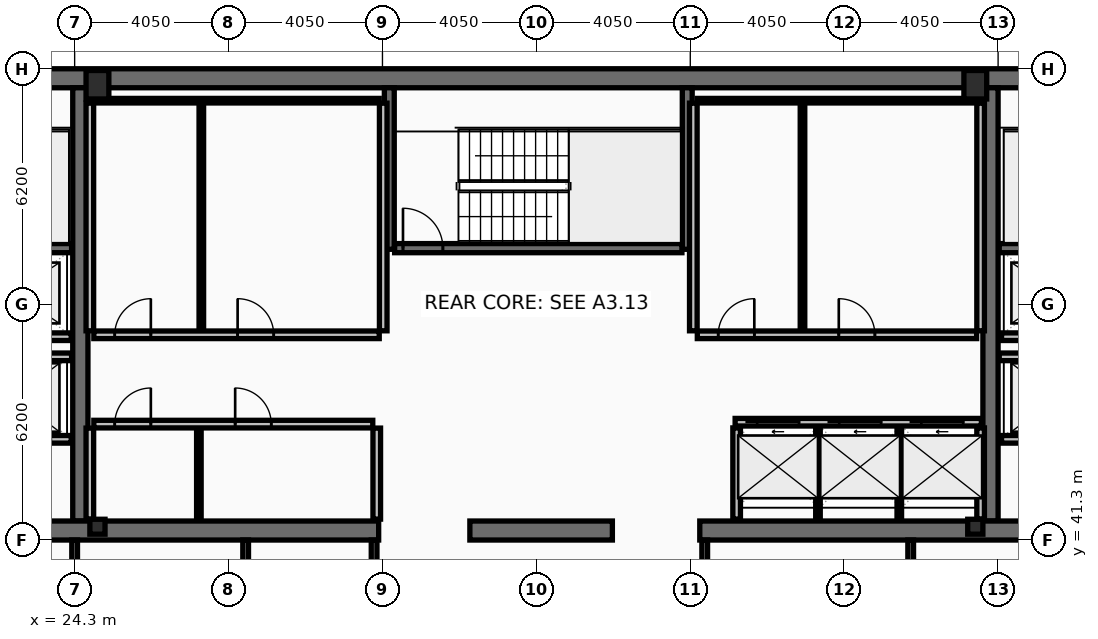
"""IFC4 building model, lengths in metres.
Left out: names, types, materials, properties, quantities, classifications, styles, units other than length and angle.
Written with IfcOpenShell. Run it as: python <this file> out.ifc"""

import sys

from ifc_helpers import new_model, si_unit, direction, frame, frame_2d, origin, origin_2d, place, context, subcontext, project, spatial, rectangle, hollow_rectangle, i_section, extrude, element, fill, save


model = new_model("IFC4")
c1 = context("Model", 3, precision=1e-05, world=origin(), true_north=direction((0.0, 1.0)))
c2 = subcontext(c1, "Body", "Model", "MODEL_VIEW")
j1 = project(units=[si_unit("LENGTHUNIT", "METRE"), si_unit("PLANEANGLEUNIT", "RADIAN")], contexts=[c1])
p1 = place(None, origin())
s1 = spatial("IfcSite", under=j1, at=p1, CompositionType="ELEMENT")
p2 = place(p1, origin())
s2 = spatial("IfcBuilding", under=s1, at=p2, CompositionType="ELEMENT")
p3 = place(p2, frame((0.0, 0.0, 287.8)))
s3 = spatial("IfcBuildingStorey", under=s2, at=p3, CompositionType="ELEMENT", Elevation=287.8)
p4 = place(p3, frame((16.2, 53.45, 0.0), z_axis=(0.0, 0.0, 1.0), x_axis=(1.0, 0.0, 0.0)))
e1 = element("IfcWall", 1, at=p4, inside=s3, PredefinedType="SHEAR", context=c2, shape_type="SweptSolid", body=[
    extrude(rectangle(XDim=40.5, YDim=0.5, at=frame_2d((20.25, 0.0))), origin(), (0.0, 0.0, 1.0), 3.44),
])
for number, where, z_axis, x_axis in (
    (2, (24.45, 41.8, 0.0), (0.0, 0.0, 1.0), (0.0, 1.0, 0.0)),
    (3, (48.4, 41.8, 0.0), (0.0, 0.0, 1.0), (0.0, 1.0, 0.0)),
):
    element("IfcWall", number, at=place(p3, frame(where, z_axis=z_axis, x_axis=x_axis)), inside=s3, PredefinedType="SHEAR", context=c2, shape_type="SweptSolid", body=[
        extrude(rectangle(XDim=11.4, YDim=0.4, at=frame_2d((5.7, 0.0))), origin(), (0.0, 0.0, 1.0), 3.44),
    ])
p5 = place(p3, frame((32.3, 41.55, 0.0), z_axis=(0.0, 0.0, 1.0), x_axis=(-1.0, 0.0, 0.0)))
e4 = element("IfcWall", 4, at=p5, inside=s3, PredefinedType="SHEAR", context=c2, shape_type="SweptSolid", body=[
    extrude(rectangle(XDim=11.45, YDim=0.5, at=frame_2d((5.725, 0.0))), origin(), (0.0, 0.0, 1.0), 3.44),
])
p6 = place(p3, frame((38.45, 41.55, 0.0), z_axis=(0.0, 0.0, 1.0), x_axis=(-1.0, 0.0, 0.0)))
e5 = element("IfcWall", 5, at=p6, inside=s3, PredefinedType="SHEAR", context=c2, shape_type="SweptSolid", body=[
    extrude(rectangle(XDim=3.75, YDim=0.5, at=frame_2d((1.875, 0.0))), origin(), (0.0, 0.0, 1.0), 3.44),
])
p7 = place(p3, frame((52.05, 41.55, 0.0), z_axis=(0.0, 0.0, 1.0), x_axis=(-1.0, 0.0, 0.0)))
e6 = element("IfcWall", 6, at=p7, inside=s3, PredefinedType="SHEAR", context=c2, shape_type="SweptSolid", body=[
    extrude(rectangle(XDim=11.3, YDim=0.5, at=frame_2d((5.65, 0.0))), origin(), (0.0, 0.0, 1.0), 3.44),
])
for number, where, z_axis, x_axis in (
    (7, (32.58, 48.95, 0.0), (0.0, 0.0, 1.0), (0.0, 1.0, 0.0)),
    (8, (40.42, 48.95, 0.0), (0.0, 0.0, 1.0), (0.0, 1.0, 0.0)),
):
    element("IfcWall", number, at=place(p3, frame(where, z_axis=z_axis, x_axis=x_axis)), inside=s3, PredefinedType="SHEAR", context=c2, shape_type="SweptSolid", body=[
        extrude(rectangle(XDim=4.25, YDim=0.26, at=frame_2d((2.125, 0.0))), origin(), (0.0, 0.0, 1.0), 3.44),
    ])
p8 = place(p3, frame((16.7, 48.98, 0.0), z_axis=(0.0, 0.0, 1.0), x_axis=(1.0, 0.0, 0.0)))
e9 = element("IfcWall", 9, at=p8, inside=s3, PredefinedType="SHEAR", context=c2, shape_type="SweptSolid", body=[
    extrude(rectangle(XDim=7.52, YDim=0.24, at=frame_2d((3.76, 0.0))), origin(), (0.0, 0.0, 1.0), 3.44),
])
p9 = place(p8, frame((0.22, 0.0, 0.0)))
e10 = element("IfcOpeningElement", 10, at=p9, cuts=e9, PredefinedType="OPENING", context=c2, shape_type="SweptSolid", body=[
    extrude(rectangle(XDim=1.05, YDim=2.15, at=frame_2d((0.525, 1.075))), frame((0.0, 0.13, 0.0), z_axis=(0.0, -1.0, 0.0), x_axis=(1.0, 0.0, 0.0)), (0.0, 0.0, 1.0), 0.26),
])
p10 = place(p3, frame((48.63, 48.98, 0.0), z_axis=(0.0, 0.0, 1.0), x_axis=(1.0, 0.0, 0.0)))
e11 = element("IfcWall", 11, at=p10, inside=s3, PredefinedType="SHEAR", context=c2, shape_type="SweptSolid", body=[
    extrude(rectangle(XDim=7.57, YDim=0.24, at=frame_2d((3.785, 0.0))), origin(), (0.0, 0.0, 1.0), 3.44),
])
p11 = place(p10, frame((6.3, 0.0, 0.0)))
e12 = element("IfcOpeningElement", 12, at=p11, cuts=e11, PredefinedType="OPENING", context=c2, shape_type="SweptSolid", body=[
    extrude(rectangle(XDim=1.05, YDim=2.15, at=frame_2d((0.525, 1.075))), frame((0.0, 0.13, 0.0), z_axis=(0.0, -1.0, 0.0), x_axis=(1.0, 0.0, 0.0)), (0.0, 0.0, 1.0), 0.26),
])
p12 = place(p3, frame((32.72, 48.98, 0.0), z_axis=(0.0, 0.0, 1.0), x_axis=(1.0, 0.0, 0.0)))
e13 = element("IfcWall", 13, at=p12, inside=s3, PredefinedType="SHEAR", context=c2, shape_type="SweptSolid", body=[
    extrude(rectangle(XDim=7.56, YDim=0.24, at=frame_2d((3.78, 0.0))), origin(), (0.0, 0.0, 1.0), 3.44),
])
p13 = place(p12, frame((0.22, 0.0, 0.0)))
e14 = element("IfcOpeningElement", 14, at=p13, cuts=e13, PredefinedType="OPENING", context=c2, shape_type="SweptSolid", body=[
    extrude(rectangle(XDim=1.05, YDim=2.15, at=frame_2d((0.525, 1.075))), frame((0.0, 0.13, 0.0), z_axis=(0.0, -1.0, 0.0), x_axis=(1.0, 0.0, 0.0)), (0.0, 0.0, 1.0), 0.26),
])
for number, where, z_axis, x_axis in (
    (15, (24.9, 53.28, 0.0), (0.0, 0.0, 1.0), (1.0, 0.0, 0.0)),
    (16, (48.0, 53.28, 0.0), (0.0, 0.0, 1.0), (1.0, 0.0, 0.0)),
):
    element("IfcColumn", number, at=place(p3, frame(where, z_axis=z_axis, x_axis=x_axis)), inside=s3, PredefinedType="COLUMN", context=c2, shape_type="SweptSolid", body=[
        extrude(hollow_rectangle(XDim=0.6, YDim=0.75, WallThickness=0.045, at=origin_2d()), origin(), (0.0, 0.0, 1.0), 3.6),
    ])
for number, where, z_axis, x_axis in (
    (17, (24.9, 41.65, 0.0), (0.0, 0.0, 1.0), (1.0, 0.0, 0.0)),
    (18, (48.0, 41.65, 0.0), (0.0, 0.0, 1.0), (1.0, 0.0, 0.0)),
):
    element("IfcColumn", number, at=place(p3, frame(where, z_axis=z_axis, x_axis=x_axis)), inside=s3, PredefinedType="COLUMN", context=c2, shape_type="SweptSolid", body=[
        extrude(i_section(OverallWidth=0.399, OverallDepth=0.393, WebThickness=0.023, FlangeThickness=0.037, at=origin_2d()), origin(), (0.0, 0.0, 1.0), 3.6),
    ])
p14 = place(p3, frame((41.68, 44.4, 0.0), z_axis=(0.0, 0.0, 1.0), x_axis=(1.0, 0.0, 0.0)))
e19 = element("IfcWall", 19, at=p14, inside=s3, PredefinedType="PARTITIONING", context=c2, shape_type="SweptSolid", body=[
    extrude(rectangle(XDim=6.48, YDim=0.2, at=frame_2d((3.24, 0.0))), origin(), (0.0, 0.0, 1.0), 3.44),
])
p15 = place(p14, frame((0.58, 0.0, 0.0)))
e20 = element("IfcOpeningElement", 20, at=p15, cuts=e19, PredefinedType="OPENING", context=c2, shape_type="SweptSolid", body=[
    extrude(rectangle(XDim=1.1, YDim=2.18, at=frame_2d((0.55, 1.09))), frame((0.0, 0.11, 0.0), z_axis=(0.0, -1.0, 0.0), x_axis=(1.0, 0.0, 0.0)), (0.0, 0.0, 1.0), 0.22),
])
p16 = place(p14, frame((2.74, 0.0, 0.0)))
e21 = element("IfcOpeningElement", 21, at=p16, cuts=e19, PredefinedType="OPENING", context=c2, shape_type="SweptSolid", body=[
    extrude(rectangle(XDim=1.1, YDim=2.18, at=frame_2d((0.55, 1.09))), frame((0.0, 0.11, 0.0), z_axis=(0.0, -1.0, 0.0), x_axis=(1.0, 0.0, 0.0)), (0.0, 0.0, 1.0), 0.22),
])
p17 = place(p14, frame((4.9, 0.0, 0.0)))
e22 = element("IfcOpeningElement", 22, at=p17, cuts=e19, PredefinedType="OPENING", context=c2, shape_type="SweptSolid", body=[
    extrude(rectangle(XDim=1.1, YDim=2.18, at=frame_2d((0.55, 1.09))), frame((0.0, 0.11, 0.0), z_axis=(0.0, -1.0, 0.0), x_axis=(1.0, 0.0, 0.0)), (0.0, 0.0, 1.0), 0.22),
])
p18 = place(p3, frame((51.61, 43.95, 0.0), z_axis=(0.0, 0.0, 1.0), x_axis=(-1.0, 0.0, 0.0)))
e23 = element("IfcWall", 23, at=p18, inside=s3, PredefinedType="PARTITIONING", context=c2, shape_type="SweptSolid", body=[
    extrude(rectangle(XDim=2.92, YDim=0.2, at=frame_2d((1.46, 0.0))), origin(), (0.0, 0.0, 1.0), 3.44),
])
p19 = place(p18, frame((0.81, 0.0, 0.0)))
e24 = element("IfcOpeningElement", 24, at=p19, cuts=e23, PredefinedType="OPENING", context=c2, shape_type="SweptSolid", body=[
    extrude(rectangle(XDim=1.3, YDim=2.18, at=frame_2d((0.65, 1.09))), frame((0.0, 0.11, 0.0), z_axis=(0.0, -1.0, 0.0), x_axis=(1.0, 0.0, 0.0)), (0.0, 0.0, 1.0), 0.22),
])
p20 = place(p3, frame((24.21, 43.95, 0.0), z_axis=(0.0, 0.0, 1.0), x_axis=(-1.0, 0.0, 0.0)))
e25 = element("IfcWall", 25, at=p20, inside=s3, PredefinedType="PARTITIONING", context=c2, shape_type="SweptSolid", body=[
    extrude(rectangle(XDim=2.97, YDim=0.2, at=frame_2d((1.485, 0.0))), origin(), (0.0, 0.0, 1.0), 3.44),
])
p21 = place(p20, frame((0.86, 0.0, 0.0)))
e26 = element("IfcOpeningElement", 26, at=p21, cuts=e25, PredefinedType="OPENING", context=c2, shape_type="SweptSolid", body=[
    extrude(rectangle(XDim=1.3, YDim=2.18, at=frame_2d((0.65, 1.09))), frame((0.0, 0.11, 0.0), z_axis=(0.0, -1.0, 0.0), x_axis=(1.0, 0.0, 0.0)), (0.0, 0.0, 1.0), 0.22),
])
p22 = place(p3, frame((51.61, 46.65, 0.0), z_axis=(0.0, 0.0, 1.0), x_axis=(-1.0, 0.0, 0.0)))
e27 = element("IfcWall", 27, at=p22, inside=s3, PredefinedType="PARTITIONING", context=c2, shape_type="SweptSolid", body=[
    extrude(rectangle(XDim=2.92, YDim=0.2, at=frame_2d((1.46, 0.0))), origin(), (0.0, 0.0, 1.0), 3.44),
])
p23 = place(p22, frame((0.86, 0.0, 0.0)))
e28 = element("IfcOpeningElement", 28, at=p23, cuts=e27, PredefinedType="OPENING", context=c2, shape_type="SweptSolid", body=[
    extrude(rectangle(XDim=1.2, YDim=2.18, at=frame_2d((0.6, 1.09))), frame((0.0, 0.11, 0.0), z_axis=(0.0, -1.0, 0.0), x_axis=(1.0, 0.0, 0.0)), (0.0, 0.0, 1.0), 0.22),
])
p24 = place(p3, frame((24.21, 46.65, 0.0), z_axis=(0.0, 0.0, 1.0), x_axis=(-1.0, 0.0, 0.0)))
e29 = element("IfcWall", 29, at=p24, inside=s3, PredefinedType="PARTITIONING", context=c2, shape_type="SweptSolid", body=[
    extrude(rectangle(XDim=2.97, YDim=0.2, at=frame_2d((1.485, 0.0))), origin(), (0.0, 0.0, 1.0), 3.44),
])
p25 = place(p24, frame((0.91, 0.0, 0.0)))
e30 = element("IfcOpeningElement", 30, at=p25, cuts=e29, PredefinedType="OPENING", context=c2, shape_type="SweptSolid", body=[
    extrude(rectangle(XDim=1.2, YDim=2.18, at=frame_2d((0.6, 1.09))), frame((0.0, 0.11, 0.0), z_axis=(0.0, -1.0, 0.0), x_axis=(1.0, 0.0, 0.0)), (0.0, 0.0, 1.0), 0.22),
])
p26 = place(p3, frame((21.2, 46.12, 0.0), z_axis=(0.0, 0.0, 1.0), x_axis=(1.0, 0.0, 0.0)))
e31 = element("IfcWall", 31, at=p26, inside=s3, PredefinedType="PARTITIONING", context=c2, shape_type="SweptSolid", body=[
    extrude(rectangle(XDim=3.02, YDim=0.2, at=frame_2d((1.51, 0.0))), origin(), (0.0, 0.0, 1.0), 3.44),
])
p27 = place(p3, frame((48.63, 46.12, 0.0), z_axis=(0.0, 0.0, 1.0), x_axis=(1.0, 0.0, 0.0)))
e32 = element("IfcWall", 32, at=p27, inside=s3, PredefinedType="PARTITIONING", context=c2, shape_type="SweptSolid", body=[
    extrude(rectangle(XDim=3.07, YDim=0.2, at=frame_2d((1.535, 0.0))), origin(), (0.0, 0.0, 1.0), 3.44),
])
for number, where, z_axis, x_axis in (
    (33, (24.7, 46.805, 0.0), (0.0, 0.0, 1.0), (0.0, 1.0, 0.0)),
    (34, (32.42, 46.805, 0.0), (0.0, 0.0, 1.0), (0.0, 1.0, 0.0)),
):
    element("IfcWall", number, at=place(p3, frame(where, z_axis=z_axis, x_axis=x_axis)), inside=s3, PredefinedType="PARTITIONING", context=c2, shape_type="SweptSolid", body=[
        extrude(rectangle(XDim=5.99, YDim=0.2, at=frame_2d((2.995, 0.0))), origin(), (0.0, 0.0, 1.0), 3.44),
    ])
p28 = place(p3, frame((24.805, 52.86, 0.0), z_axis=(0.0, 0.0, 1.0), x_axis=(1.0, 0.0, 0.0)))
e35 = element("IfcWall", 35, at=p28, inside=s3, PredefinedType="PARTITIONING", context=c2, shape_type="SweptSolid", body=[
    extrude(rectangle(XDim=7.51, YDim=0.12, at=frame_2d((3.755, 0.0))), origin(), (0.0, 0.0, 1.0), 3.44),
])
p29 = place(p3, frame((27.634, 46.805, 0.0), z_axis=(0.0, 0.0, 1.0), x_axis=(0.0, 1.0, 0.0)))
e36 = element("IfcWall", 36, at=p29, inside=s3, PredefinedType="PARTITIONING", context=c2, shape_type="SweptSolid", body=[
    extrude(rectangle(XDim=5.99, YDim=0.12, at=frame_2d((2.995, 0.0))), origin(), (0.0, 0.0, 1.0), 3.44),
])
p30 = place(p3, frame((24.805, 46.7, 0.0), z_axis=(0.0, 0.0, 1.0), x_axis=(1.0, 0.0, 0.0)))
e37 = element("IfcWall", 37, at=p30, inside=s3, PredefinedType="PARTITIONING", context=c2, shape_type="SweptSolid", body=[
    extrude(rectangle(XDim=7.51, YDim=0.2, at=frame_2d((3.755, 0.0))), origin(), (0.0, 0.0, 1.0), 3.44),
])
p31 = place(p30, frame((0.55, 0.0, 0.0)))
e38 = element("IfcOpeningElement", 38, at=p31, cuts=e37, PredefinedType="OPENING", context=c2, shape_type="SweptSolid", body=[
    extrude(rectangle(XDim=0.95, YDim=2.1, at=frame_2d((0.475, 1.05))), frame((0.0, 0.11, 0.0), z_axis=(0.0, -1.0, 0.0), x_axis=(1.0, 0.0, 0.0)), (0.0, 0.0, 1.0), 0.22),
])
p32 = place(p30, frame((3.784, 0.0, 0.0)))
e39 = element("IfcOpeningElement", 39, at=p32, cuts=e37, PredefinedType="OPENING", context=c2, shape_type="SweptSolid", body=[
    extrude(rectangle(XDim=0.95, YDim=2.1, at=frame_2d((0.475, 1.05))), frame((0.0, 0.11, 0.0), z_axis=(0.0, -1.0, 0.0), x_axis=(1.0, 0.0, 0.0)), (0.0, 0.0, 1.0), 0.22),
])
for number, where, z_axis, x_axis in (
    (40, (24.7, 41.85, 0.0), (0.0, 0.0, 1.0), (0.0, 1.0, 0.0)),
    (41, (32.25, 41.85, 0.0), (0.0, 0.0, 1.0), (0.0, 1.0, 0.0)),
):
    element("IfcWall", number, at=place(p3, frame(where, z_axis=z_axis, x_axis=x_axis)), inside=s3, PredefinedType="PARTITIONING", context=c2, shape_type="SweptSolid", body=[
        extrude(rectangle(XDim=2.395, YDim=0.2, at=frame_2d((1.198, 0.0))), origin(), (0.0, 0.0, 1.0), 3.44),
    ])
p33 = place(p3, frame((27.569, 41.85, 0.0), z_axis=(0.0, 0.0, 1.0), x_axis=(0.0, 1.0, 0.0)))
e42 = element("IfcWall", 42, at=p33, inside=s3, PredefinedType="PARTITIONING", context=c2, shape_type="SweptSolid", body=[
    extrude(rectangle(XDim=2.395, YDim=0.12, at=frame_2d((1.198, 0.0))), origin(), (0.0, 0.0, 1.0), 3.44),
])
p34 = place(p3, frame((24.805, 44.35, 0.0), z_axis=(0.0, 0.0, 1.0), x_axis=(1.0, 0.0, 0.0)))
e43 = element("IfcWall", 43, at=p34, inside=s3, PredefinedType="PARTITIONING", context=c2, shape_type="SweptSolid", body=[
    extrude(rectangle(XDim=7.34, YDim=0.2, at=frame_2d((3.67, 0.0))), origin(), (0.0, 0.0, 1.0), 3.44),
])
p35 = place(p34, frame((0.55, 0.0, 0.0)))
e44 = element("IfcOpeningElement", 44, at=p35, cuts=e43, PredefinedType="OPENING", context=c2, shape_type="SweptSolid", body=[
    extrude(rectangle(XDim=0.95, YDim=2.1, at=frame_2d((0.475, 1.05))), frame((0.0, 0.11, 0.0), z_axis=(0.0, -1.0, 0.0), x_axis=(1.0, 0.0, 0.0)), (0.0, 0.0, 1.0), 0.22),
])
p36 = place(p34, frame((3.719, 0.0, 0.0)))
e45 = element("IfcOpeningElement", 45, at=p36, cuts=e43, PredefinedType="OPENING", context=c2, shape_type="SweptSolid", body=[
    extrude(rectangle(XDim=0.95, YDim=2.1, at=frame_2d((0.475, 1.05))), frame((0.0, 0.11, 0.0), z_axis=(0.0, -1.0, 0.0), x_axis=(1.0, 0.0, 0.0)), (0.0, 0.0, 1.0), 0.22),
])
for number, where, z_axis, x_axis in (
    (46, (40.58, 46.805, 0.0), (0.0, 0.0, 1.0), (0.0, 1.0, 0.0)),
    (47, (48.14, 46.805, 0.0), (0.0, 0.0, 1.0), (0.0, 1.0, 0.0)),
):
    element("IfcWall", number, at=place(p3, frame(where, z_axis=z_axis, x_axis=x_axis)), inside=s3, PredefinedType="PARTITIONING", context=c2, shape_type="SweptSolid", body=[
        extrude(rectangle(XDim=5.99, YDim=0.2, at=frame_2d((2.995, 0.0))), origin(), (0.0, 0.0, 1.0), 3.44),
    ])
p37 = place(p3, frame((40.685, 52.86, 0.0), z_axis=(0.0, 0.0, 1.0), x_axis=(1.0, 0.0, 0.0)))
e48 = element("IfcWall", 48, at=p37, inside=s3, PredefinedType="PARTITIONING", context=c2, shape_type="SweptSolid", body=[
    extrude(rectangle(XDim=7.35, YDim=0.12, at=frame_2d((3.675, 0.0))), origin(), (0.0, 0.0, 1.0), 3.44),
])
p38 = place(p3, frame((43.453, 46.805, 0.0), z_axis=(0.0, 0.0, 1.0), x_axis=(0.0, 1.0, 0.0)))
e49 = element("IfcWall", 49, at=p38, inside=s3, PredefinedType="PARTITIONING", context=c2, shape_type="SweptSolid", body=[
    extrude(rectangle(XDim=5.99, YDim=0.12, at=frame_2d((2.995, 0.0))), origin(), (0.0, 0.0, 1.0), 3.44),
])
p39 = place(p3, frame((40.685, 46.7, 0.0), z_axis=(0.0, 0.0, 1.0), x_axis=(1.0, 0.0, 0.0)))
e50 = element("IfcWall", 50, at=p39, inside=s3, PredefinedType="PARTITIONING", context=c2, shape_type="SweptSolid", body=[
    extrude(rectangle(XDim=7.35, YDim=0.2, at=frame_2d((3.675, 0.0))), origin(), (0.0, 0.0, 1.0), 3.44),
])
p40 = place(p39, frame((0.55, 0.0, 0.0)))
e51 = element("IfcOpeningElement", 51, at=p40, cuts=e50, PredefinedType="OPENING", context=c2, shape_type="SweptSolid", body=[
    extrude(rectangle(XDim=0.95, YDim=2.1, at=frame_2d((0.475, 1.05))), frame((0.0, 0.11, 0.0), z_axis=(0.0, -1.0, 0.0), x_axis=(1.0, 0.0, 0.0)), (0.0, 0.0, 1.0), 0.22),
])
p41 = place(p39, frame((3.723, 0.0, 0.0)))
e52 = element("IfcOpeningElement", 52, at=p41, cuts=e50, PredefinedType="OPENING", context=c2, shape_type="SweptSolid", body=[
    extrude(rectangle(XDim=0.95, YDim=2.1, at=frame_2d((0.475, 1.05))), frame((0.0, 0.11, 0.0), z_axis=(0.0, -1.0, 0.0), x_axis=(1.0, 0.0, 0.0)), (0.0, 0.0, 1.0), 0.22),
])
for number, where, z_axis, x_axis in (
    (53, (41.72, 41.85, 0.0), (0.0, 0.0, 1.0), (0.0, 1.0, 0.0)),
    (54, (48.14, 41.85, 0.0), (0.0, 0.0, 1.0), (0.0, 1.0, 0.0)),
):
    element("IfcWall", number, at=place(p3, frame(where, z_axis=z_axis, x_axis=x_axis)), inside=s3, PredefinedType="PARTITIONING", context=c2, shape_type="SweptSolid", body=[
        extrude(rectangle(XDim=2.4, YDim=0.2, at=frame_2d((1.2, 0.0))), origin(), (0.0, 0.0, 1.0), 3.44),
    ])
for number, where, z_axis, x_axis in (
    (55, (43.86, 41.85, 0.0), (0.0, 0.0, 1.0), (0.0, 1.0, 0.0)),
    (56, (46.0, 41.85, 0.0), (0.0, 0.0, 1.0), (0.0, 1.0, 0.0)),
):
    element("IfcWall", number, at=place(p3, frame(where, z_axis=z_axis, x_axis=x_axis)), inside=s3, PredefinedType="PARTITIONING", context=c2, shape_type="SweptSolid", body=[
        extrude(rectangle(XDim=2.4, YDim=0.12, at=frame_2d((1.2, 0.0))), origin(), (0.0, 0.0, 1.0), 3.44),
    ])
for number, where, z_axis, x_axis in (
    (57, (24.3, 38.28, 0.0), (0.0, 0.0, 1.0), (0.0, 1.0, 0.0)),
    (58, (28.8, 38.28, 0.0), (0.0, 0.0, 1.0), (0.0, 1.0, 0.0)),
    (59, (32.18, 38.28, 0.0), (0.0, 0.0, 1.0), (0.0, 1.0, 0.0)),
    (60, (40.88, 38.28, 0.0), (0.0, 0.0, 1.0), (0.0, 1.0, 0.0)),
    (61, (46.3, 38.28, 0.0), (0.0, 0.0, 1.0), (0.0, 1.0, 0.0)),
):
    element("IfcWall", number, at=place(p3, frame(where, z_axis=z_axis, x_axis=x_axis)), inside=s3, PredefinedType="PARTITIONING", context=c2, shape_type="SweptSolid", body=[
        extrude(rectangle(XDim=3.02, YDim=0.15, at=frame_2d((1.51, 0.0))), origin(), (0.0, 0.0, 1.0), 3.44),
    ])
p42 = place(p13, origin())
e62 = element("IfcDoor", 62, at=p42, inside=s3, OperationType="SINGLE_SWING_LEFT", PredefinedType="DOOR", context=c2, shape_type="SweptSolid", body=[
    extrude(rectangle(XDim=1.05, YDim=2.15, at=frame_2d((0.525, 1.075))), frame((0.0, 0.025, 0.0), z_axis=(0.0, -1.0, 0.0), x_axis=(1.0, 0.0, 0.0)), (0.0, 0.0, 1.0), 0.05),
])
fill(e14, e62)
p43 = place(p15, origin())
e63 = element("IfcDoor", 63, at=p43, inside=s3, OperationType="SLIDING_TO_LEFT", PredefinedType="DOOR", context=c2, shape_type="SweptSolid", body=[
    extrude(rectangle(XDim=1.1, YDim=2.18, at=frame_2d((0.55, 1.09))), frame((0.0, 0.025, 0.0), z_axis=(0.0, -1.0, 0.0), x_axis=(1.0, 0.0, 0.0)), (0.0, 0.0, 1.0), 0.05),
])
fill(e20, e63)
p44 = place(p16, origin())
e64 = element("IfcDoor", 64, at=p44, inside=s3, OperationType="SLIDING_TO_LEFT", PredefinedType="DOOR", context=c2, shape_type="SweptSolid", body=[
    extrude(rectangle(XDim=1.1, YDim=2.18, at=frame_2d((0.55, 1.09))), frame((0.0, 0.025, 0.0), z_axis=(0.0, -1.0, 0.0), x_axis=(1.0, 0.0, 0.0)), (0.0, 0.0, 1.0), 0.05),
])
fill(e21, e64)
p45 = place(p17, origin())
e65 = element("IfcDoor", 65, at=p45, inside=s3, OperationType="SLIDING_TO_LEFT", PredefinedType="DOOR", context=c2, shape_type="SweptSolid", body=[
    extrude(rectangle(XDim=1.1, YDim=2.18, at=frame_2d((0.55, 1.09))), frame((0.0, 0.025, 0.0), z_axis=(0.0, -1.0, 0.0), x_axis=(1.0, 0.0, 0.0)), (0.0, 0.0, 1.0), 0.05),
])
fill(e22, e65)
p46 = place(p31, origin())
e66 = element("IfcDoor", 66, at=p46, inside=s3, OperationType="SINGLE_SWING_RIGHT", PredefinedType="DOOR", context=c2, shape_type="SweptSolid", body=[
    extrude(rectangle(XDim=0.95, YDim=2.1, at=frame_2d((0.475, 1.05))), frame((0.0, 0.025, 0.0), z_axis=(0.0, -1.0, 0.0), x_axis=(1.0, 0.0, 0.0)), (0.0, 0.0, 1.0), 0.05),
])
fill(e38, e66)
p47 = place(p32, origin())
e67 = element("IfcDoor", 67, at=p47, inside=s3, OperationType="SINGLE_SWING_LEFT", PredefinedType="DOOR", context=c2, shape_type="SweptSolid", body=[
    extrude(rectangle(XDim=0.95, YDim=2.1, at=frame_2d((0.475, 1.05))), frame((0.0, 0.025, 0.0), z_axis=(0.0, -1.0, 0.0), x_axis=(1.0, 0.0, 0.0)), (0.0, 0.0, 1.0), 0.05),
])
fill(e39, e67)
p48 = place(p35, origin())
e68 = element("IfcDoor", 68, at=p48, inside=s3, OperationType="SINGLE_SWING_RIGHT", PredefinedType="DOOR", context=c2, shape_type="SweptSolid", body=[
    extrude(rectangle(XDim=0.95, YDim=2.1, at=frame_2d((0.475, 1.05))), frame((0.0, 0.025, 0.0), z_axis=(0.0, -1.0, 0.0), x_axis=(1.0, 0.0, 0.0)), (0.0, 0.0, 1.0), 0.05),
])
fill(e44, e68)
p49 = place(p36, origin())
e69 = element("IfcDoor", 69, at=p49, inside=s3, OperationType="SINGLE_SWING_LEFT", PredefinedType="DOOR", context=c2, shape_type="SweptSolid", body=[
    extrude(rectangle(XDim=0.95, YDim=2.1, at=frame_2d((0.475, 1.05))), frame((0.0, 0.025, 0.0), z_axis=(0.0, -1.0, 0.0), x_axis=(1.0, 0.0, 0.0)), (0.0, 0.0, 1.0), 0.05),
])
fill(e45, e69)
p50 = place(p40, origin())
e70 = element("IfcDoor", 70, at=p50, inside=s3, OperationType="SINGLE_SWING_RIGHT", PredefinedType="DOOR", context=c2, shape_type="SweptSolid", body=[
    extrude(rectangle(XDim=0.95, YDim=2.1, at=frame_2d((0.475, 1.05))), frame((0.0, 0.025, 0.0), z_axis=(0.0, -1.0, 0.0), x_axis=(1.0, 0.0, 0.0)), (0.0, 0.0, 1.0), 0.05),
])
fill(e51, e70)
p51 = place(p41, origin())
e71 = element("IfcDoor", 71, at=p51, inside=s3, OperationType="SINGLE_SWING_LEFT", PredefinedType="DOOR", context=c2, shape_type="SweptSolid", body=[
    extrude(rectangle(XDim=0.95, YDim=2.1, at=frame_2d((0.475, 1.05))), frame((0.0, 0.025, 0.0), z_axis=(0.0, -1.0, 0.0), x_axis=(1.0, 0.0, 0.0)), (0.0, 0.0, 1.0), 0.05),
])
fill(e52, e71)
save(model, sys.argv[1])
